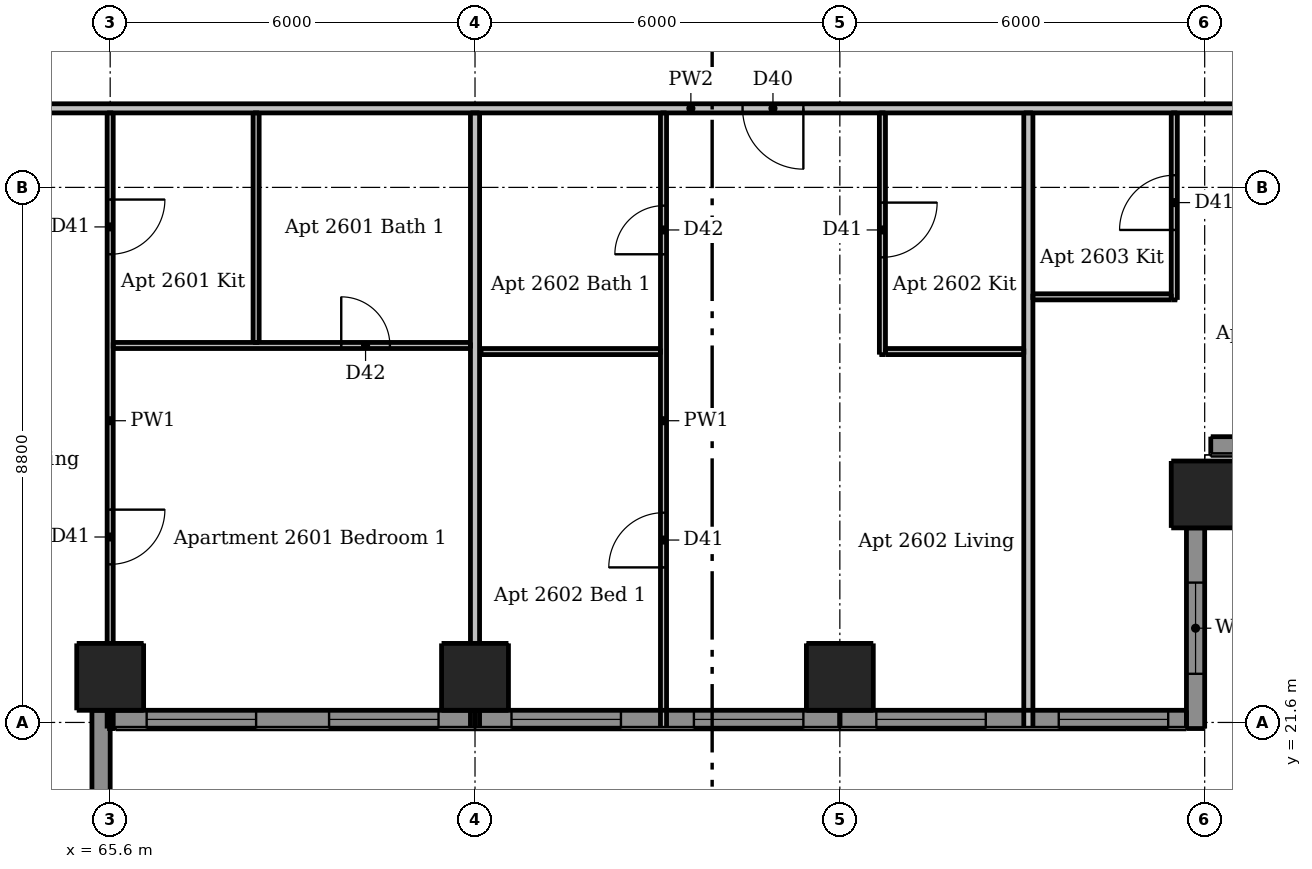
"""IFC4 building model, lengths in metres.
Left out: names, types, materials, properties, quantities, classifications, styles, units other than length and angle.
Written with IfcOpenShell. Run it as: python <this file> out.ifc"""

import sys

from ifc_helpers import new_model, si_unit, direction, frame, frame_2d, origin, origin_2d, place, context, subcontext, project, spatial, rectangle, extrude, element, fill, save


model = new_model("IFC4")
c1 = context("Model", 3, precision=1e-05, world=origin(), true_north=direction((0.0, 1.0)))
c2 = subcontext(c1, "Body", "Model", "MODEL_VIEW")
j1 = project(units=[si_unit("LENGTHUNIT", "METRE"), si_unit("PLANEANGLEUNIT", "RADIAN")], contexts=[c1])
p1 = place(None, origin())
s1 = spatial("IfcSite", under=j1, at=p1, CompositionType="ELEMENT")
p2 = place(p1, origin())
s2 = spatial("IfcBuilding", under=s1, at=p2, CompositionType="ELEMENT")
p3 = place(p2, frame((0.0, 0.0, 98.5)))
s3 = spatial("IfcBuildingStorey", under=s2, at=p3, CompositionType="ELEMENT", Elevation=98.5)
for number, where, z_axis, x_axis in (
    (1, (65.6, 22.35, 0.0), (0.0, 0.0, 1.0), (1.0, 0.0, 0.0)),
    (2, (71.6, 22.35, 0.0), (0.0, 0.0, 1.0), (1.0, 0.0, 0.0)),
    (3, (77.6, 22.35, 0.0), (0.0, 0.0, 1.0), (1.0, 0.0, 0.0)),
    (4, (83.6, 25.35, 0.0), (0.0, 0.0, 1.0), (1.0, 0.0, 0.0)),
):
    element("IfcColumn", number, at=place(p3, frame(where, z_axis=z_axis, x_axis=x_axis)), inside=s3, PredefinedType="COLUMN", context=c2, shape_type="SweptSolid", body=[
        extrude(rectangle(XDim=1.1, YDim=1.1, at=origin_2d()), origin(), (0.0, 0.0, 1.0), 3.05),
    ])
p4 = place(p3, frame((65.45, 20.0, 0.0), z_axis=(0.0, 0.0, 1.0), x_axis=(0.0, 1.0, 0.0)))
e5 = element("IfcWall", 5, at=p4, inside=s3, PredefinedType="SOLIDWALL", context=c2, shape_type="SweptSolid", body=[
    extrude(rectangle(XDim=1.8, YDim=0.3, at=frame_2d((0.9, 0.0))), origin(), (0.0, 0.0, 1.0), 3.05),
])
p5 = place(p3, frame((83.45, 21.5, 0.0), z_axis=(0.0, 0.0, 1.0), x_axis=(0.0, 1.0, 0.0)))
e6 = element("IfcWall", 6, at=p5, inside=s3, PredefinedType="SOLIDWALL", context=c2, shape_type="SweptSolid", body=[
    extrude(rectangle(XDim=3.3, YDim=0.3, at=frame_2d((1.65, 0.0))), origin(), (0.0, 0.0, 1.0), 3.05),
])
p6 = place(p5, frame((0.9, 0.0, 0.9)))
e7 = element("IfcOpeningElement", 7, at=p6, cuts=e6, PredefinedType="OPENING", context=c2, shape_type="SweptSolid", body=[
    extrude(rectangle(XDim=1.5, YDim=1.5, at=frame_2d((0.75, 0.75))), frame((0.0, 0.16, 0.0), z_axis=(0.0, -1.0, 0.0), x_axis=(1.0, 0.0, 0.0)), (0.0, 0.0, 1.0), 0.32),
])
p7 = place(p3, frame((65.6, 21.65, 0.0), z_axis=(0.0, 0.0, 1.0), x_axis=(1.0, 0.0, 0.0)))
e8 = element("IfcWall", 8, at=p7, inside=s3, PredefinedType="SOLIDWALL", context=c2, shape_type="SweptSolid", body=[
    extrude(rectangle(XDim=6.0, YDim=0.3, at=frame_2d((3.0, 0.0))), origin(), (0.0, 0.0, 1.0), 3.05),
])
p8 = place(p7, frame((0.6, 0.0, 0.15)))
e9 = element("IfcOpeningElement", 9, at=p8, cuts=e8, PredefinedType="OPENING", context=c2, shape_type="SweptSolid", body=[
    extrude(rectangle(XDim=1.8, YDim=2.1, at=frame_2d((0.9, 1.05))), frame((0.0, 0.16, 0.0), z_axis=(0.0, -1.0, 0.0), x_axis=(1.0, 0.0, 0.0)), (0.0, 0.0, 1.0), 0.32),
])
p9 = place(p7, frame((3.6, 0.0, 0.15)))
e10 = element("IfcOpeningElement", 10, at=p9, cuts=e8, PredefinedType="OPENING", context=c2, shape_type="SweptSolid", body=[
    extrude(rectangle(XDim=1.8, YDim=2.1, at=frame_2d((0.9, 1.05))), frame((0.0, 0.16, 0.0), z_axis=(0.0, -1.0, 0.0), x_axis=(1.0, 0.0, 0.0)), (0.0, 0.0, 1.0), 0.32),
])
p10 = place(p3, frame((71.6, 21.65, 0.0), z_axis=(0.0, 0.0, 1.0), x_axis=(1.0, 0.0, 0.0)))
e11 = element("IfcWall", 11, at=p10, inside=s3, PredefinedType="SOLIDWALL", context=c2, shape_type="SweptSolid", body=[
    extrude(rectangle(XDim=6.0, YDim=0.3, at=frame_2d((3.0, 0.0))), origin(), (0.0, 0.0, 1.0), 3.05),
])
p11 = place(p10, frame((0.6, 0.0, 0.15)))
e12 = element("IfcOpeningElement", 12, at=p11, cuts=e11, PredefinedType="OPENING", context=c2, shape_type="SweptSolid", body=[
    extrude(rectangle(XDim=1.8, YDim=2.1, at=frame_2d((0.9, 1.05))), frame((0.0, 0.16, 0.0), z_axis=(0.0, -1.0, 0.0), x_axis=(1.0, 0.0, 0.0)), (0.0, 0.0, 1.0), 0.32),
])
p12 = place(p10, frame((3.6, 0.0, 0.15)))
e13 = element("IfcOpeningElement", 13, at=p12, cuts=e11, PredefinedType="OPENING", context=c2, shape_type="SweptSolid", body=[
    extrude(rectangle(XDim=1.8, YDim=2.1, at=frame_2d((0.9, 1.05))), frame((0.0, 0.16, 0.0), z_axis=(0.0, -1.0, 0.0), x_axis=(1.0, 0.0, 0.0)), (0.0, 0.0, 1.0), 0.32),
])
p13 = place(p3, frame((77.6, 21.65, 0.0), z_axis=(0.0, 0.0, 1.0), x_axis=(1.0, 0.0, 0.0)))
e14 = element("IfcWall", 14, at=p13, inside=s3, PredefinedType="SOLIDWALL", context=c2, shape_type="SweptSolid", body=[
    extrude(rectangle(XDim=5.7, YDim=0.3, at=frame_2d((2.85, 0.0))), origin(), (0.0, 0.0, 1.0), 3.05),
])
p14 = place(p13, frame((0.6, 0.0, 0.15)))
e15 = element("IfcOpeningElement", 15, at=p14, cuts=e14, PredefinedType="OPENING", context=c2, shape_type="SweptSolid", body=[
    extrude(rectangle(XDim=1.8, YDim=2.1, at=frame_2d((0.9, 1.05))), frame((0.0, 0.16, 0.0), z_axis=(0.0, -1.0, 0.0), x_axis=(1.0, 0.0, 0.0)), (0.0, 0.0, 1.0), 0.32),
])
p15 = place(p13, frame((3.6, 0.0, 0.15)))
e16 = element("IfcOpeningElement", 16, at=p15, cuts=e14, PredefinedType="OPENING", context=c2, shape_type="SweptSolid", body=[
    extrude(rectangle(XDim=1.8, YDim=2.1, at=frame_2d((0.9, 1.05))), frame((0.0, 0.16, 0.0), z_axis=(0.0, -1.0, 0.0), x_axis=(1.0, 0.0, 0.0)), (0.0, 0.0, 1.0), 0.32),
])
p16 = place(p3, frame((83.7, 26.15, 0.0), z_axis=(0.0, 0.0, 1.0), x_axis=(1.0, 0.0, 0.0)))
e17 = element("IfcWall", 17, at=p16, inside=s3, PredefinedType="SOLIDWALL", context=c2, shape_type="SweptSolid", body=[
    extrude(rectangle(XDim=5.79, YDim=0.3, at=frame_2d((2.895, 0.0))), origin(), (0.0, 0.0, 1.0), 3.05),
])
p17 = place(p16, frame((0.5, 0.0, 0.15)))
e18 = element("IfcOpeningElement", 18, at=p17, cuts=e17, PredefinedType="OPENING", context=c2, shape_type="SweptSolid", body=[
    extrude(rectangle(XDim=1.8, YDim=2.1, at=frame_2d((0.9, 1.05))), frame((0.0, 0.16, 0.0), z_axis=(0.0, -1.0, 0.0), x_axis=(1.0, 0.0, 0.0)), (0.0, 0.0, 1.0), 0.32),
])
p18 = place(p16, frame((3.5, 0.0, 0.15)))
e19 = element("IfcOpeningElement", 19, at=p18, cuts=e17, PredefinedType="OPENING", context=c2, shape_type="SweptSolid", body=[
    extrude(rectangle(XDim=1.8, YDim=2.1, at=frame_2d((0.9, 1.05))), frame((0.0, 0.16, 0.0), z_axis=(0.0, -1.0, 0.0), x_axis=(1.0, 0.0, 0.0)), (0.0, 0.0, 1.0), 0.32),
])
p19 = place(p3, frame((65.6, 31.625, 0.0), z_axis=(0.0, 0.0, 1.0), x_axis=(0.0, -1.0, 0.0)))
e20 = element("IfcWall", 20, at=p19, inside=s3, PredefinedType="PARTITIONING", context=c2, shape_type="SweptSolid", body=[
    extrude(rectangle(XDim=10.125, YDim=0.1, at=frame_2d((5.062, 0.0))), origin(), (0.0, 0.0, 1.0), 2.516),
])
p20 = place(p19, frame((1.425, 0.0, 0.0)))
e21 = element("IfcOpeningElement", 21, at=p20, cuts=e20, PredefinedType="OPENING", context=c2, shape_type="SweptSolid", body=[
    extrude(rectangle(XDim=0.9, YDim=2.1, at=frame_2d((0.45, 1.05))), frame((0.0, 0.06, 0.0), z_axis=(0.0, -1.0, 0.0), x_axis=(1.0, 0.0, 0.0)), (0.0, 0.0, 1.0), 0.12),
])
p21 = place(p19, frame((6.525, 0.0, 0.0)))
e22 = element("IfcOpeningElement", 22, at=p21, cuts=e20, PredefinedType="OPENING", context=c2, shape_type="SweptSolid", body=[
    extrude(rectangle(XDim=0.9, YDim=2.1, at=frame_2d((0.45, 1.05))), frame((0.0, 0.06, 0.0), z_axis=(0.0, -1.0, 0.0), x_axis=(1.0, 0.0, 0.0)), (0.0, 0.0, 1.0), 0.12),
])
p22 = place(p3, frame((68.0, 27.85, 0.0), z_axis=(0.0, 0.0, 1.0), x_axis=(0.0, 1.0, 0.0)))
e23 = element("IfcWall", 23, at=p22, inside=s3, PredefinedType="PARTITIONING", context=c2, shape_type="SweptSolid", body=[
    extrude(rectangle(XDim=3.775, YDim=0.1, at=frame_2d((1.887, 0.0))), origin(), (0.0, 0.0, 1.0), 3.05),
])
p23 = place(p3, frame((74.7, 21.5, 0.0), z_axis=(0.0, 0.0, 1.0), x_axis=(0.0, 1.0, 0.0)))
e24 = element("IfcWall", 24, at=p23, inside=s3, PredefinedType="PARTITIONING", context=c2, shape_type="SweptSolid", body=[
    extrude(rectangle(XDim=10.125, YDim=0.1, at=frame_2d((5.062, 0.0))), origin(), (0.0, 0.0, 1.0), 3.05),
])
p24 = place(p23, frame((2.65, 0.0, 0.0)))
e25 = element("IfcOpeningElement", 25, at=p24, cuts=e24, PredefinedType="OPENING", context=c2, shape_type="SweptSolid", body=[
    extrude(rectangle(XDim=0.9, YDim=2.1, at=frame_2d((0.45, 1.05))), frame((0.0, 0.06, 0.0), z_axis=(0.0, -1.0, 0.0), x_axis=(1.0, 0.0, 0.0)), (0.0, 0.0, 1.0), 0.12),
])
p25 = place(p23, frame((7.8, 0.0, 0.0)))
e26 = element("IfcOpeningElement", 26, at=p25, cuts=e24, PredefinedType="OPENING", context=c2, shape_type="SweptSolid", body=[
    extrude(rectangle(XDim=0.8, YDim=2.1, at=frame_2d((0.4, 1.05))), frame((0.0, 0.06, 0.0), z_axis=(0.0, -1.0, 0.0), x_axis=(1.0, 0.0, 0.0)), (0.0, 0.0, 1.0), 0.12),
])
p26 = place(p3, frame((78.3, 31.625, 0.0), z_axis=(0.0, 0.0, 1.0), x_axis=(0.0, -1.0, 0.0)))
e27 = element("IfcWall", 27, at=p26, inside=s3, PredefinedType="PARTITIONING", context=c2, shape_type="SweptSolid", body=[
    extrude(rectangle(XDim=3.975, YDim=0.1, at=frame_2d((1.988, 0.0))), origin(), (0.0, 0.0, 1.0), 3.05),
])
p27 = place(p26, frame((1.475, 0.0, 0.0)))
e28 = element("IfcOpeningElement", 28, at=p27, cuts=e27, PredefinedType="OPENING", context=c2, shape_type="SweptSolid", body=[
    extrude(rectangle(XDim=0.9, YDim=2.1, at=frame_2d((0.45, 1.05))), frame((0.0, 0.06, 0.0), z_axis=(0.0, -1.0, 0.0), x_axis=(1.0, 0.0, 0.0)), (0.0, 0.0, 1.0), 0.12),
])
p28 = place(p3, frame((83.1, 28.55, 0.0), z_axis=(0.0, 0.0, 1.0), x_axis=(0.0, 1.0, 0.0)))
e29 = element("IfcWall", 29, at=p28, inside=s3, PredefinedType="PARTITIONING", context=c2, shape_type="SweptSolid", body=[
    extrude(rectangle(XDim=3.075, YDim=0.1, at=frame_2d((1.538, 0.0))), origin(), (0.0, 0.0, 1.0), 3.05),
])
p29 = place(p28, frame((1.15, 0.0, 0.0)))
e30 = element("IfcOpeningElement", 30, at=p29, cuts=e29, PredefinedType="OPENING", context=c2, shape_type="SweptSolid", body=[
    extrude(rectangle(XDim=0.9, YDim=2.1, at=frame_2d((0.45, 1.05))), frame((0.0, 0.06, 0.0), z_axis=(0.0, -1.0, 0.0), x_axis=(1.0, 0.0, 0.0)), (0.0, 0.0, 1.0), 0.12),
])
p30 = place(p3, frame((80.775, 28.6, 0.0), z_axis=(0.0, 0.0, 1.0), x_axis=(1.0, 0.0, 0.0)))
e31 = element("IfcWall", 31, at=p30, inside=s3, PredefinedType="PARTITIONING", context=c2, shape_type="SweptSolid", body=[
    extrude(rectangle(XDim=2.275, YDim=0.1, at=frame_2d((1.138, 0.0))), origin(), (0.0, 0.0, 1.0), 3.05),
])
p31 = place(p3, frame((65.65, 27.8, 0.0), z_axis=(0.0, 0.0, 1.0), x_axis=(1.0, 0.0, 0.0)))
e32 = element("IfcWall", 32, at=p31, inside=s3, PredefinedType="PARTITIONING", context=c2, shape_type="SweptSolid", body=[
    extrude(rectangle(XDim=5.875, YDim=0.1, at=frame_2d((2.938, 0.0))), origin(), (0.0, 0.0, 1.0), 3.05),
])
p32 = place(p31, frame((3.75, 0.0, 0.0)))
e33 = element("IfcOpeningElement", 33, at=p32, cuts=e32, PredefinedType="OPENING", context=c2, shape_type="SweptSolid", body=[
    extrude(rectangle(XDim=0.8, YDim=2.1, at=frame_2d((0.4, 1.05))), frame((0.0, 0.06, 0.0), z_axis=(0.0, -1.0, 0.0), x_axis=(1.0, 0.0, 0.0)), (0.0, 0.0, 1.0), 0.12),
])
p33 = place(p3, frame((71.7, 27.7, 0.0), z_axis=(0.0, 0.0, 1.0), x_axis=(1.0, 0.0, 0.0)))
e34 = element("IfcWall", 34, at=p33, inside=s3, PredefinedType="PARTITIONING", context=c2, shape_type="SweptSolid", body=[
    extrude(rectangle(XDim=2.95, YDim=0.1, at=frame_2d((1.475, 0.0))), origin(), (0.0, 0.0, 1.0), 3.05),
])
p34 = place(p3, frame((78.35, 27.7, 0.0), z_axis=(0.0, 0.0, 1.0), x_axis=(1.0, 0.0, 0.0)))
e35 = element("IfcWall", 35, at=p34, inside=s3, PredefinedType="PARTITIONING", context=c2, shape_type="SweptSolid", body=[
    extrude(rectangle(XDim=2.275, YDim=0.1, at=frame_2d((1.137, 0.0))), origin(), (0.0, 0.0, 1.0), 3.05),
])
p35 = place(p3, frame((71.6, 21.5, 0.0), z_axis=(0.0, 0.0, 1.0), x_axis=(0.0, 1.0, 0.0)))
e36 = element("IfcWall", 36, at=p35, inside=s3, PredefinedType="PARTITIONING", context=c2, shape_type="SweptSolid", body=[
    extrude(rectangle(XDim=10.125, YDim=0.15, at=frame_2d((5.062, 0.0))), origin(), (0.0, 0.0, 1.0), 2.516),
])
p36 = place(p3, frame((80.7, 21.5, 0.0), z_axis=(0.0, 0.0, 1.0), x_axis=(0.0, 1.0, 0.0)))
e37 = element("IfcWall", 37, at=p36, inside=s3, PredefinedType="PARTITIONING", context=c2, shape_type="SweptSolid", body=[
    extrude(rectangle(XDim=10.125, YDim=0.15, at=frame_2d((5.062, 0.0))), origin(), (0.0, 0.0, 1.0), 3.05),
])
p37 = place(p3, frame((89.525, 31.7, 0.0), z_axis=(0.0, 0.0, 1.0), x_axis=(-1.0, 0.0, 0.0)))
e38 = element("IfcWall", 38, at=p37, inside=s3, PredefinedType="PARTITIONING", context=c2, shape_type="SweptSolid", body=[
    extrude(rectangle(XDim=28.75, YDim=0.15, at=frame_2d((14.375, 0.0))), origin(), (0.0, 0.0, 1.0), 3.05),
])
p38 = place(p37, frame((25.875, 0.0, 0.0)))
e39 = element("IfcOpeningElement", 39, at=p38, cuts=e38, PredefinedType="OPENING", context=c2, shape_type="SweptSolid", body=[
    extrude(rectangle(XDim=1.0, YDim=2.1, at=frame_2d((0.5, 1.05))), frame((0.0, 0.085, 0.0), z_axis=(0.0, -1.0, 0.0), x_axis=(1.0, 0.0, 0.0)), (0.0, 0.0, 1.0), 0.17),
])
p39 = place(p37, frame((12.525, 0.0, 0.0)))
e40 = element("IfcOpeningElement", 40, at=p39, cuts=e38, PredefinedType="OPENING", context=c2, shape_type="SweptSolid", body=[
    extrude(rectangle(XDim=1.0, YDim=2.1, at=frame_2d((0.5, 1.05))), frame((0.0, 0.085, 0.0), z_axis=(0.0, -1.0, 0.0), x_axis=(1.0, 0.0, 0.0)), (0.0, 0.0, 1.0), 0.17),
])
p40 = place(p37, frame((4.175, 0.0, 0.0)))
e41 = element("IfcOpeningElement", 41, at=p40, cuts=e38, PredefinedType="OPENING", context=c2, shape_type="SweptSolid", body=[
    extrude(rectangle(XDim=1.0, YDim=2.1, at=frame_2d((0.5, 1.05))), frame((0.0, 0.085, 0.0), z_axis=(0.0, -1.0, 0.0), x_axis=(1.0, 0.0, 0.0)), (0.0, 0.0, 1.0), 0.17),
])
p41 = place(p6, origin())
e42 = element("IfcWindow", 42, at=p41, inside=s3, PartitioningType="DOUBLE_PANEL_VERTICAL", PredefinedType="WINDOW", context=c2, shape_type="SweptSolid", body=[
    extrude(rectangle(XDim=1.5, YDim=1.5, at=frame_2d((0.75, 0.75))), frame((0.0, 0.03, 0.0), z_axis=(0.0, -1.0, 0.0), x_axis=(1.0, 0.0, 0.0)), (0.0, 0.0, 1.0), 0.06),
])
fill(e7, e42)
p42 = place(p8, origin())
e43 = element("IfcWindow", 43, at=p42, inside=s3, PartitioningType="DOUBLE_PANEL_VERTICAL", PredefinedType="WINDOW", context=c2, shape_type="SweptSolid", body=[
    extrude(rectangle(XDim=1.8, YDim=2.1, at=frame_2d((0.9, 1.05))), frame((0.0, 0.03, 0.0), z_axis=(0.0, -1.0, 0.0), x_axis=(1.0, 0.0, 0.0)), (0.0, 0.0, 1.0), 0.06),
])
fill(e9, e43)
p43 = place(p9, origin())
e44 = element("IfcWindow", 44, at=p43, inside=s3, PartitioningType="DOUBLE_PANEL_VERTICAL", PredefinedType="WINDOW", context=c2, shape_type="SweptSolid", body=[
    extrude(rectangle(XDim=1.8, YDim=2.1, at=frame_2d((0.9, 1.05))), frame((0.0, 0.03, 0.0), z_axis=(0.0, -1.0, 0.0), x_axis=(1.0, 0.0, 0.0)), (0.0, 0.0, 1.0), 0.06),
])
fill(e10, e44)
p44 = place(p11, origin())
e45 = element("IfcWindow", 45, at=p44, inside=s3, PartitioningType="DOUBLE_PANEL_VERTICAL", PredefinedType="WINDOW", context=c2, shape_type="SweptSolid", body=[
    extrude(rectangle(XDim=1.8, YDim=2.1, at=frame_2d((0.9, 1.05))), frame((0.0, 0.03, 0.0), z_axis=(0.0, -1.0, 0.0), x_axis=(1.0, 0.0, 0.0)), (0.0, 0.0, 1.0), 0.06),
])
fill(e12, e45)
p45 = place(p12, origin())
e46 = element("IfcWindow", 46, at=p45, inside=s3, PartitioningType="DOUBLE_PANEL_VERTICAL", PredefinedType="WINDOW", context=c2, shape_type="SweptSolid", body=[
    extrude(rectangle(XDim=1.8, YDim=2.1, at=frame_2d((0.9, 1.05))), frame((0.0, 0.03, 0.0), z_axis=(0.0, -1.0, 0.0), x_axis=(1.0, 0.0, 0.0)), (0.0, 0.0, 1.0), 0.06),
])
fill(e13, e46)
p46 = place(p14, origin())
e47 = element("IfcWindow", 47, at=p46, inside=s3, PartitioningType="DOUBLE_PANEL_VERTICAL", PredefinedType="WINDOW", context=c2, shape_type="SweptSolid", body=[
    extrude(rectangle(XDim=1.8, YDim=2.1, at=frame_2d((0.9, 1.05))), frame((0.0, 0.03, 0.0), z_axis=(0.0, -1.0, 0.0), x_axis=(1.0, 0.0, 0.0)), (0.0, 0.0, 1.0), 0.06),
])
fill(e15, e47)
p47 = place(p15, origin())
e48 = element("IfcWindow", 48, at=p47, inside=s3, PartitioningType="DOUBLE_PANEL_VERTICAL", PredefinedType="WINDOW", context=c2, shape_type="SweptSolid", body=[
    extrude(rectangle(XDim=1.8, YDim=2.1, at=frame_2d((0.9, 1.05))), frame((0.0, 0.03, 0.0), z_axis=(0.0, -1.0, 0.0), x_axis=(1.0, 0.0, 0.0)), (0.0, 0.0, 1.0), 0.06),
])
fill(e16, e48)
p48 = place(p20, origin())
e49 = element("IfcDoor", 49, at=p48, inside=s3, OperationType="SINGLE_SWING_LEFT", PredefinedType="DOOR", context=c2, shape_type="SweptSolid", body=[
    extrude(rectangle(XDim=0.9, YDim=2.1, at=frame_2d((0.45, 1.05))), frame((0.0, 0.025, 0.0), z_axis=(0.0, -1.0, 0.0), x_axis=(1.0, 0.0, 0.0)), (0.0, 0.0, 1.0), 0.05),
])
fill(e21, e49)
p49 = place(p21, origin())
e50 = element("IfcDoor", 50, at=p49, inside=s3, OperationType="SINGLE_SWING_LEFT", PredefinedType="DOOR", context=c2, shape_type="SweptSolid", body=[
    extrude(rectangle(XDim=0.9, YDim=2.1, at=frame_2d((0.45, 1.05))), frame((0.0, 0.025, 0.0), z_axis=(0.0, -1.0, 0.0), x_axis=(1.0, 0.0, 0.0)), (0.0, 0.0, 1.0), 0.05),
])
fill(e22, e50)
p50 = place(p32, origin())
e51 = element("IfcDoor", 51, at=p50, inside=s3, OperationType="SINGLE_SWING_LEFT", PredefinedType="DOOR", context=c2, shape_type="SweptSolid", body=[
    extrude(rectangle(XDim=0.8, YDim=2.1, at=frame_2d((0.4, 1.05))), frame((0.0, 0.025, 0.0), z_axis=(0.0, -1.0, 0.0), x_axis=(1.0, 0.0, 0.0)), (0.0, 0.0, 1.0), 0.05),
])
fill(e33, e51)
p51 = place(p39, origin())
e52 = element("IfcDoor", 52, at=p51, inside=s3, OperationType="SINGLE_SWING_LEFT", PredefinedType="DOOR", context=c2, shape_type="SweptSolid", body=[
    extrude(rectangle(XDim=1.0, YDim=2.1, at=frame_2d((0.5, 1.05))), frame((0.0, 0.025, 0.0), z_axis=(0.0, -1.0, 0.0), x_axis=(1.0, 0.0, 0.0)), (0.0, 0.0, 1.0), 0.05),
])
fill(e40, e52)
p52 = place(p27, origin())
e53 = element("IfcDoor", 53, at=p52, inside=s3, OperationType="SINGLE_SWING_LEFT", PredefinedType="DOOR", context=c2, shape_type="SweptSolid", body=[
    extrude(rectangle(XDim=0.9, YDim=2.1, at=frame_2d((0.45, 1.05))), frame((0.0, 0.025, 0.0), z_axis=(0.0, -1.0, 0.0), x_axis=(1.0, 0.0, 0.0)), (0.0, 0.0, 1.0), 0.05),
])
fill(e28, e53)
p53 = place(p24, origin())
e54 = element("IfcDoor", 54, at=p53, inside=s3, OperationType="SINGLE_SWING_LEFT", PredefinedType="DOOR", context=c2, shape_type="SweptSolid", body=[
    extrude(rectangle(XDim=0.9, YDim=2.1, at=frame_2d((0.45, 1.05))), frame((0.0, 0.025, 0.0), z_axis=(0.0, -1.0, 0.0), x_axis=(1.0, 0.0, 0.0)), (0.0, 0.0, 1.0), 0.05),
])
fill(e25, e54)
p54 = place(p25, origin())
e55 = element("IfcDoor", 55, at=p54, inside=s3, OperationType="SINGLE_SWING_LEFT", PredefinedType="DOOR", context=c2, shape_type="SweptSolid", body=[
    extrude(rectangle(XDim=0.8, YDim=2.1, at=frame_2d((0.4, 1.05))), frame((0.0, 0.025, 0.0), z_axis=(0.0, -1.0, 0.0), x_axis=(1.0, 0.0, 0.0)), (0.0, 0.0, 1.0), 0.05),
])
fill(e26, e55)
p55 = place(p29, origin())
e56 = element("IfcDoor", 56, at=p55, inside=s3, OperationType="SINGLE_SWING_LEFT", PredefinedType="DOOR", context=c2, shape_type="SweptSolid", body=[
    extrude(rectangle(XDim=0.9, YDim=2.1, at=frame_2d((0.45, 1.05))), frame((0.0, 0.025, 0.0), z_axis=(0.0, -1.0, 0.0), x_axis=(1.0, 0.0, 0.0)), (0.0, 0.0, 1.0), 0.05),
])
fill(e30, e56)
save(model, sys.argv[1])
